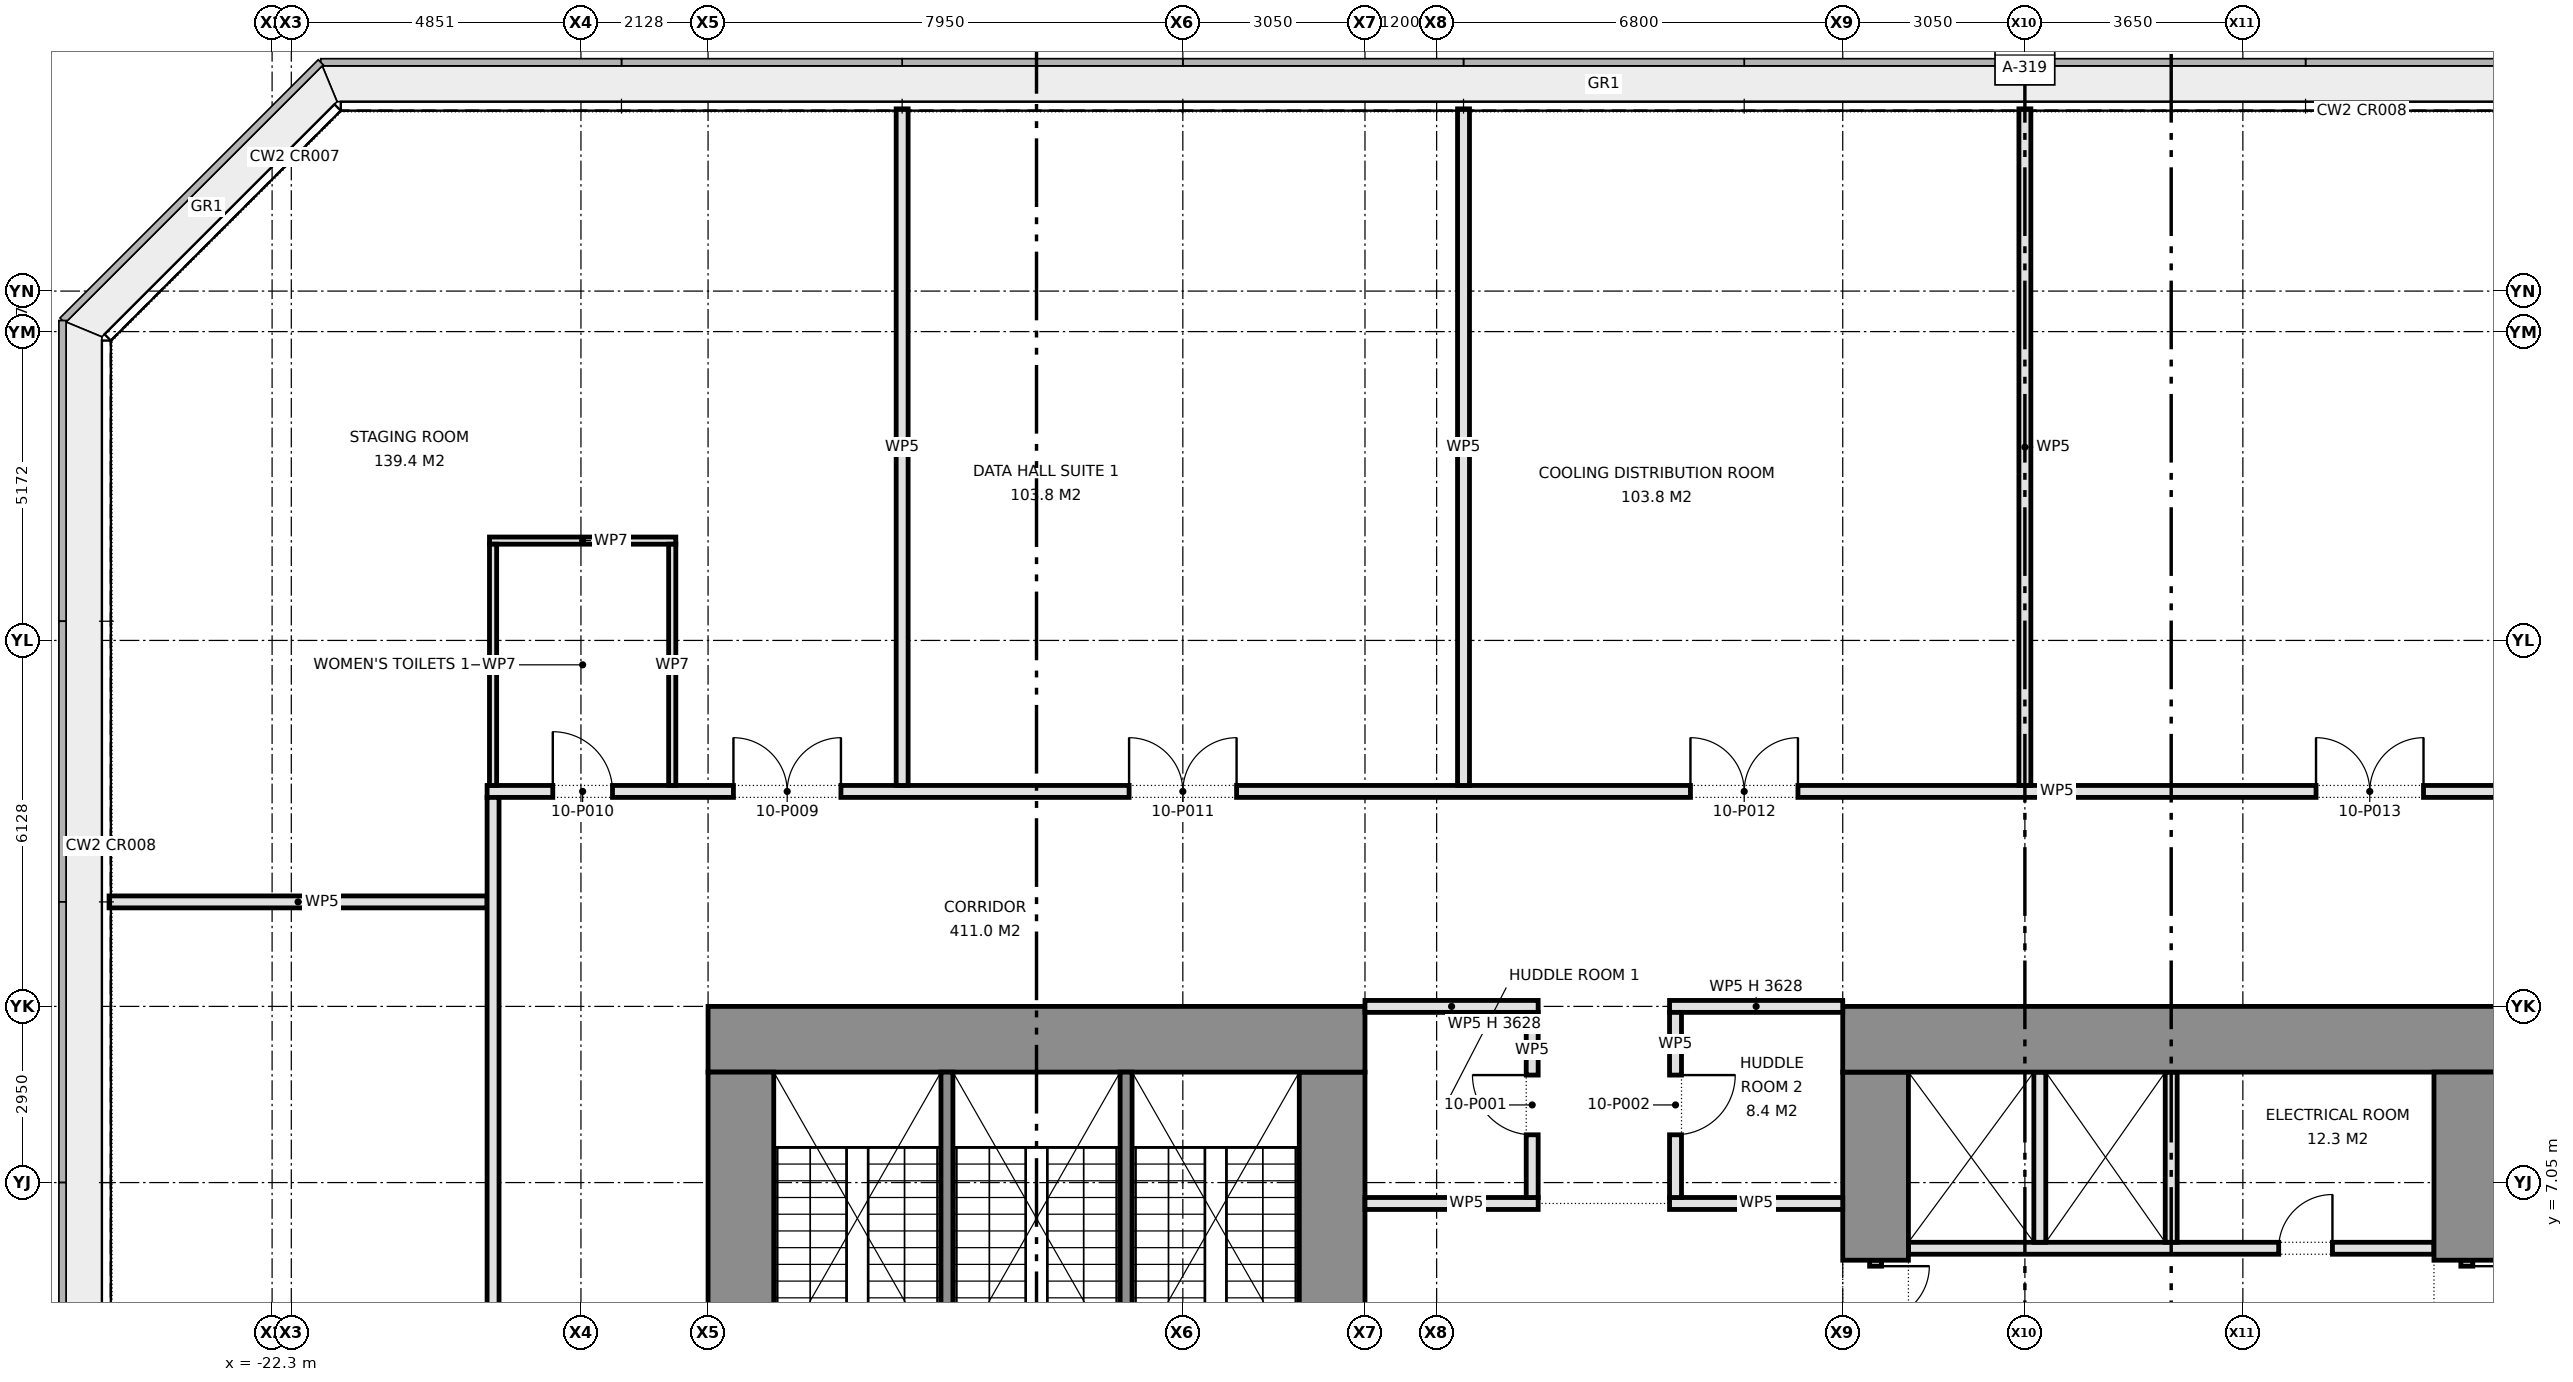
"""IFC4 building model, lengths in metres.
Left out: names, types, materials, properties, quantities, classifications, styles, units other than length and angle.
Written with IfcOpenShell. Run it as: python <this file> out.ifc"""

import sys

from ifc_helpers import new_model, si_unit, direction, frame, frame_2d, origin, place, context, subcontext, project, spatial, rectangle, extrude, element, fill, save


model = new_model("IFC4")
c1 = context("Model", 3, precision=1e-05, world=origin(), true_north=direction((0.0, 1.0)))
c2 = subcontext(c1, "Body", "Model", "MODEL_VIEW")
j1 = project(units=[si_unit("LENGTHUNIT", "METRE"), si_unit("PLANEANGLEUNIT", "RADIAN")], contexts=[c1])
p1 = place(None, origin())
s1 = spatial("IfcSite", under=j1, at=p1, CompositionType="ELEMENT")
p2 = place(p1, origin())
s2 = spatial("IfcBuilding", under=s1, at=p2, CompositionType="ELEMENT")
p3 = place(p2, frame((0.0, 0.0, 44.9)))
s3 = spatial("IfcBuildingStorey", under=s2, at=p3, CompositionType="ELEMENT", Elevation=44.9)
p4 = place(p3, frame((-15.0, 9.45, 0.0), z_axis=(0.0, 0.0, 1.0), x_axis=(1.0, 0.0, 0.0)))
e1 = element("IfcWall", 1, at=p4, inside=s3, PredefinedType="SHEAR", context=c2, shape_type="SweptSolid", body=[
    extrude(rectangle(XDim=11.0, YDim=1.1, at=frame_2d((5.5, 0.0))), origin(), (0.0, 0.0, 1.0), 4.575),
])
p5 = place(p3, frame((-14.45, 3.68, 0.0), z_axis=(0.0, 0.0, 1.0), x_axis=(0.0, 1.0, 0.0)))
e2 = element("IfcWall", 2, at=p5, inside=s3, PredefinedType="SHEAR", context=c2, shape_type="SweptSolid", body=[
    extrude(rectangle(XDim=5.22, YDim=1.1, at=frame_2d((2.61, 0.0))), origin(), (0.0, 0.0, 1.0), 4.575),
])
p6 = place(p3, frame((-4.55, 1.55, 0.0), z_axis=(0.0, 0.0, 1.0), x_axis=(0.0, 1.0, 0.0)))
e3 = element("IfcWall", 3, at=p6, inside=s3, PredefinedType="SHEAR", context=c2, shape_type="SweptSolid", body=[
    extrude(rectangle(XDim=7.35, YDim=1.1, at=frame_2d((3.675, 0.0))), origin(), (0.0, 0.0, 1.0), 4.575),
])
for number, where, z_axis, x_axis in (
    (4, (-11.0, 2.38, 0.0), (0.0, 0.0, 1.0), (0.0, 1.0, 0.0)),
    (5, (-8.0, 2.38, 0.0), (0.0, 0.0, 1.0), (0.0, 1.0, 0.0)),
):
    element("IfcWall", number, at=place(p3, frame(where, z_axis=z_axis, x_axis=x_axis)), inside=s3, PredefinedType="SHEAR", context=c2, shape_type="SweptSolid", body=[
        extrude(rectangle(XDim=6.52, YDim=0.2, at=frame_2d((3.26, 0.0))), origin(), (0.0, 0.0, 1.0), 4.575),
    ])
p7 = place(p3, frame((15.0, 9.45, 0.0), z_axis=(0.0, 0.0, 1.0), x_axis=(-1.0, 0.0, 0.0)))
e6 = element("IfcWall", 6, at=p7, inside=s3, PredefinedType="SHEAR", context=c2, shape_type="SweptSolid", body=[
    extrude(rectangle(XDim=11.0, YDim=1.1, at=frame_2d((5.5, 0.0))), origin(), (0.0, 0.0, 1.0), 4.575),
])
p8 = place(p3, frame((14.45, 8.9, 0.0), z_axis=(0.0, 0.0, 1.0), x_axis=(0.0, -1.0, 0.0)))
e7 = element("IfcWall", 7, at=p8, inside=s3, PredefinedType="SHEAR", context=c2, shape_type="SweptSolid", body=[
    extrude(rectangle(XDim=3.15, YDim=1.1, at=frame_2d((1.575, 0.0))), origin(), (0.0, 0.0, 1.0), 4.575),
])
p9 = place(p3, frame((14.45, 5.75, 0.0), z_axis=(0.0, 0.0, 1.0), x_axis=(0.0, -1.0, 0.0)))
e8 = element("IfcWall", 8, at=p9, inside=s3, PredefinedType="PARTITIONING", context=c2, shape_type="SweptSolid", body=[
    extrude(rectangle(XDim=2.0, YDim=0.2, at=frame_2d((1.0, 0.0))), origin(), (0.0, 0.0, 1.0), 2.4),
])
p10 = place(p9, frame((0.1, 0.0, 0.0)))
e9 = element("IfcOpeningElement", 9, at=p10, cuts=e8, PredefinedType="OPENING", context=c2, shape_type="SweptSolid", body=[
    extrude(rectangle(XDim=1.8, YDim=2.1, at=frame_2d((0.9, 1.05))), frame((0.0, 0.11, 0.0), z_axis=(0.0, -1.0, 0.0), x_axis=(1.0, 0.0, 0.0)), (0.0, 0.0, 1.0), 0.22),
])
p11 = place(p3, frame((4.55, 8.9, 0.0), z_axis=(0.0, 0.0, 1.0), x_axis=(0.0, -1.0, 0.0)))
e10 = element("IfcWall", 10, at=p11, inside=s3, PredefinedType="SHEAR", context=c2, shape_type="SweptSolid", body=[
    extrude(rectangle(XDim=3.15, YDim=1.1, at=frame_2d((1.575, 0.0))), origin(), (0.0, 0.0, 1.0), 4.575),
])
p12 = place(p3, frame((4.55, 5.75, 0.0), z_axis=(0.0, 0.0, 1.0), x_axis=(0.0, -1.0, 0.0)))
e11 = element("IfcWall", 11, at=p12, inside=s3, PredefinedType="PARTITIONING", context=c2, shape_type="SweptSolid", body=[
    extrude(rectangle(XDim=2.0, YDim=0.2, at=frame_2d((1.0, 0.0))), origin(), (0.0, 0.0, 1.0), 2.4),
])
p13 = place(p12, frame((0.1, 0.0, 0.0)))
e12 = element("IfcOpeningElement", 12, at=p13, cuts=e11, PredefinedType="OPENING", context=c2, shape_type="SweptSolid", body=[
    extrude(rectangle(XDim=1.8, YDim=2.1, at=frame_2d((0.9, 1.05))), frame((0.0, 0.11, 0.0), z_axis=(0.0, -1.0, 0.0), x_axis=(1.0, 0.0, 0.0)), (0.0, 0.0, 1.0), 0.22),
])
p14 = place(p3, frame((13.9, 5.95, 0.0), z_axis=(0.0, 0.0, 1.0), x_axis=(-1.0, 0.0, 0.0)))
e13 = element("IfcWall", 13, at=p14, inside=s3, PredefinedType="PARTITIONING", context=c2, shape_type="SweptSolid", body=[
    extrude(rectangle(XDim=8.8, YDim=0.2, at=frame_2d((4.4, 0.0))), origin(), (0.0, 0.0, 1.0), 4.575),
])
p15 = place(p14, frame((1.7, 0.0, 0.0)))
e14 = element("IfcOpeningElement", 14, at=p15, cuts=e13, PredefinedType="OPENING", context=c2, shape_type="SweptSolid", body=[
    extrude(rectangle(XDim=0.9, YDim=2.1, at=frame_2d((0.45, 1.05))), frame((0.0, 0.11, 0.0), z_axis=(0.0, -1.0, 0.0), x_axis=(1.0, 0.0, 0.0)), (0.0, 0.0, 1.0), 0.22),
])
for number, where, z_axis, x_axis in (
    (15, (9.5, 8.9, 0.0), (0.0, 0.0, 1.0), (0.0, -1.0, 0.0)),
    (16, (7.3, 8.9, 0.0), (0.0, 0.0, 1.0), (0.0, -1.0, 0.0)),
):
    element("IfcWall", number, at=place(p3, frame(where, z_axis=z_axis, x_axis=x_axis)), inside=s3, PredefinedType="PARTITIONING", context=c2, shape_type="SweptSolid", body=[
        extrude(rectangle(XDim=2.85, YDim=0.2, at=frame_2d((1.425, 0.0))), origin(), (0.0, 0.0, 1.0), 4.575),
    ])
for number, where, z_axis, x_axis in (
    (17, (-4.0, 6.7, 0.0), (0.0, 0.0, 1.0), (1.0, 0.0, 0.0)),
    (18, (1.1, 6.7, 0.0), (0.0, 0.0, 1.0), (1.0, 0.0, 0.0)),
):
    element("IfcWall", number, at=place(p3, frame(where, z_axis=z_axis, x_axis=x_axis)), inside=s3, PredefinedType="PARTITIONING", context=c2, shape_type="SweptSolid", body=[
        extrude(rectangle(XDim=2.9, YDim=0.2, at=frame_2d((1.45, 0.0))), origin(), (0.0, 0.0, 1.0), 4.575),
    ])
for number, where, z_axis, x_axis in (
    (19, (-4.0, 10.0, 0.0), (0.0, 0.0, 1.0), (1.0, 0.0, 0.0)),
    (20, (1.1, 10.0, 0.0), (0.0, 0.0, 1.0), (1.0, 0.0, 0.0)),
):
    element("IfcWall", number, at=place(p3, frame(where, z_axis=z_axis, x_axis=x_axis)), inside=s3, PredefinedType="PARTITIONING", context=c2, shape_type="SweptSolid", body=[
        extrude(rectangle(XDim=2.9, YDim=0.2, at=frame_2d((1.45, 0.0))), origin(), (0.0, 0.0, 1.0), 3.628),
    ])
p16 = place(p3, frame((-25.03, 11.75, 0.0), z_axis=(0.0, 0.0, 1.0), x_axis=(1.0, 0.0, 0.0)))
e21 = element("IfcWall", 21, at=p16, inside=s3, PredefinedType="PARTITIONING", context=c2, shape_type="SweptSolid", body=[
    extrude(rectangle(XDim=6.33, YDim=0.2, at=frame_2d((3.165, 0.0))), origin(), (0.0, 0.0, 1.0), 4.575),
])
p17 = place(p3, frame((-18.7, 13.6, 0.0), z_axis=(0.0, 0.0, 1.0), x_axis=(1.0, 0.0, 0.0)))
e22 = element("IfcWall", 22, at=p17, inside=s3, PredefinedType="PARTITIONING", context=c2, shape_type="SweptSolid", body=[
    extrude(rectangle(XDim=37.4, YDim=0.2, at=frame_2d((18.7, 0.0))), origin(), (0.0, 0.0, 1.0), 4.575),
])
p18 = place(p17, frame((4.125, 0.0, 0.0)))
e23 = element("IfcOpeningElement", 23, at=p18, cuts=e22, PredefinedType="OPENING", context=c2, shape_type="SweptSolid", body=[
    extrude(rectangle(XDim=1.8, YDim=2.1, at=frame_2d((0.9, 1.05))), frame((0.0, 0.11, 0.0), z_axis=(0.0, -1.0, 0.0), x_axis=(1.0, 0.0, 0.0)), (0.0, 0.0, 1.0), 0.22),
])
p19 = place(p17, frame((1.1, 0.0, 0.0)))
e24 = element("IfcOpeningElement", 24, at=p19, cuts=e22, PredefinedType="OPENING", context=c2, shape_type="SweptSolid", body=[
    extrude(rectangle(XDim=1.0, YDim=2.1, at=frame_2d((0.5, 1.05))), frame((0.0, 0.11, 0.0), z_axis=(0.0, -1.0, 0.0), x_axis=(1.0, 0.0, 0.0)), (0.0, 0.0, 1.0), 0.22),
])
p20 = place(p17, frame((10.75, 0.0, 0.0)))
e25 = element("IfcOpeningElement", 25, at=p20, cuts=e22, PredefinedType="OPENING", context=c2, shape_type="SweptSolid", body=[
    extrude(rectangle(XDim=1.8, YDim=2.1, at=frame_2d((0.9, 1.05))), frame((0.0, 0.11, 0.0), z_axis=(0.0, -1.0, 0.0), x_axis=(1.0, 0.0, 0.0)), (0.0, 0.0, 1.0), 0.22),
])
p21 = place(p17, frame((20.15, 0.0, 0.0)))
e26 = element("IfcOpeningElement", 26, at=p21, cuts=e22, PredefinedType="OPENING", context=c2, shape_type="SweptSolid", body=[
    extrude(rectangle(XDim=1.8, YDim=2.1, at=frame_2d((0.9, 1.05))), frame((0.0, 0.11, 0.0), z_axis=(0.0, -1.0, 0.0), x_axis=(1.0, 0.0, 0.0)), (0.0, 0.0, 1.0), 0.22),
])
p22 = place(p17, frame((30.625, 0.0, 0.0)))
e27 = element("IfcOpeningElement", 27, at=p22, cuts=e22, PredefinedType="OPENING", context=c2, shape_type="SweptSolid", body=[
    extrude(rectangle(XDim=1.8, YDim=2.1, at=frame_2d((0.9, 1.05))), frame((0.0, 0.11, 0.0), z_axis=(0.0, -1.0, 0.0), x_axis=(1.0, 0.0, 0.0)), (0.0, 0.0, 1.0), 0.22),
])
p23 = place(p3, frame((7.05, 13.7, 0.0), z_axis=(0.0, 0.0, 1.0), x_axis=(0.0, 1.0, 0.0)))
e28 = element("IfcWall", 28, at=p23, inside=s3, PredefinedType="PARTITIONING", context=c2, shape_type="SweptSolid", body=[
    extrude(rectangle(XDim=11.33, YDim=0.2, at=frame_2d((5.665, 0.0))), origin(), (0.0, 0.0, 1.0), 4.575),
])
p24 = place(p3, frame((1.2, 6.8, 0.0), z_axis=(0.0, 0.0, 1.0), x_axis=(0.0, 1.0, 0.0)))
e29 = element("IfcWall", 29, at=p24, inside=s3, PredefinedType="PARTITIONING", context=c2, shape_type="SweptSolid", body=[
    extrude(rectangle(XDim=3.1, YDim=0.2, at=frame_2d((1.55, 0.0))), origin(), (0.0, 0.0, 1.0), 4.575),
])
p25 = place(p24, frame((1.05, 0.0, 0.0)))
e30 = element("IfcOpeningElement", 30, at=p25, cuts=e29, PredefinedType="OPENING", context=c2, shape_type="SweptSolid", body=[
    extrude(rectangle(XDim=1.0, YDim=2.1, at=frame_2d((0.5, 1.05))), frame((0.0, 0.11, 0.0), z_axis=(0.0, -1.0, 0.0), x_axis=(1.0, 0.0, 0.0)), (0.0, 0.0, 1.0), 0.22),
])
p26 = place(p3, frame((-1.2, 6.8, 0.0), z_axis=(0.0, 0.0, 1.0), x_axis=(0.0, 1.0, 0.0)))
e31 = element("IfcWall", 31, at=p26, inside=s3, PredefinedType="PARTITIONING", context=c2, shape_type="SweptSolid", body=[
    extrude(rectangle(XDim=3.1, YDim=0.2, at=frame_2d((1.55, 0.0))), origin(), (0.0, 0.0, 1.0), 4.575),
])
p27 = place(p26, frame((1.05, 0.0, 0.0)))
e32 = element("IfcOpeningElement", 32, at=p27, cuts=e31, PredefinedType="OPENING", context=c2, shape_type="SweptSolid", body=[
    extrude(rectangle(XDim=1.0, YDim=2.1, at=frame_2d((0.5, 1.05))), frame((0.0, 0.11, 0.0), z_axis=(0.0, -1.0, 0.0), x_axis=(1.0, 0.0, 0.0)), (0.0, 0.0, 1.0), 0.22),
])
for number, where, z_axis, x_axis in (
    (33, (-2.35, 13.7, 0.0), (0.0, 0.0, 1.0), (0.0, 1.0, 0.0)),
    (34, (-11.75, 13.7, 0.0), (0.0, 0.0, 1.0), (0.0, 1.0, 0.0)),
):
    element("IfcWall", number, at=place(p3, frame(where, z_axis=z_axis, x_axis=x_axis)), inside=s3, PredefinedType="PARTITIONING", context=c2, shape_type="SweptSolid", body=[
        extrude(rectangle(XDim=11.33, YDim=0.2, at=frame_2d((5.665, 0.0))), origin(), (0.0, 0.0, 1.0), 4.575),
    ])
p28 = place(p3, frame((-18.6, -13.5, 0.0), z_axis=(0.0, 0.0, 1.0), x_axis=(0.0, 1.0, 0.0)))
e35 = element("IfcWall", 35, at=p28, inside=s3, PredefinedType="PARTITIONING", context=c2, shape_type="SweptSolid", body=[
    extrude(rectangle(XDim=27.0, YDim=0.2, at=frame_2d((13.5, 0.0))), origin(), (0.0, 0.0, 1.0), 4.575),
])
p29 = place(p28, frame((12.6, 0.0, 0.0)))
e36 = element("IfcOpeningElement", 36, at=p29, cuts=e35, PredefinedType="OPENING", context=c2, shape_type="SweptSolid", body=[
    extrude(rectangle(XDim=1.8, YDim=2.1, at=frame_2d((0.9, 1.05))), frame((0.0, 0.11, 0.0), z_axis=(0.0, -1.0, 0.0), x_axis=(1.0, 0.0, 0.0)), (0.0, 0.0, 1.0), 0.22),
])
p30 = place(p3, frame((-18.66, 17.8, 0.0), z_axis=(0.0, 0.0, 1.0), x_axis=(1.0, 0.0, 0.0)))
e37 = element("IfcWall", 37, at=p30, inside=s3, PredefinedType="PARTITIONING", context=c2, shape_type="SweptSolid", body=[
    extrude(rectangle(XDim=3.12, YDim=0.12, at=frame_2d((1.56, 0.0))), origin(), (0.0, 0.0, 1.0), 4.575),
])
for number, where, z_axis, x_axis in (
    (38, (-15.6, 13.7, 0.0), (0.0, 0.0, 1.0), (0.0, 1.0, 0.0)),
    (39, (-18.6, 13.7, 0.0), (0.0, 0.0, 1.0), (0.0, 1.0, 0.0)),
):
    element("IfcWall", number, at=place(p3, frame(where, z_axis=z_axis, x_axis=x_axis)), inside=s3, PredefinedType="PARTITIONING", context=c2, shape_type="SweptSolid", body=[
        extrude(rectangle(XDim=4.04, YDim=0.12, at=frame_2d((2.02, 0.0))), origin(), (0.0, 0.0, 1.0), 4.575),
    ])
p31 = place(p10, origin())
e40 = element("IfcDoor", 40, at=p31, inside=s3, OperationType="DOUBLE_DOOR_SINGLE_SWING", PredefinedType="DOOR", context=c2, shape_type="SweptSolid", body=[
    extrude(rectangle(XDim=1.8, YDim=2.1, at=frame_2d((0.9, 1.05))), frame((0.0, 0.025, 0.0), z_axis=(0.0, -1.0, 0.0), x_axis=(1.0, 0.0, 0.0)), (0.0, 0.0, 1.0), 0.05),
])
fill(e9, e40)
p32 = place(p13, origin())
e41 = element("IfcDoor", 41, at=p32, inside=s3, OperationType="DOUBLE_DOOR_SINGLE_SWING", PredefinedType="DOOR", context=c2, shape_type="SweptSolid", body=[
    extrude(rectangle(XDim=1.8, YDim=2.1, at=frame_2d((0.9, 1.05))), frame((0.0, 0.025, 0.0), z_axis=(0.0, -1.0, 0.0), x_axis=(1.0, 0.0, 0.0)), (0.0, 0.0, 1.0), 0.05),
])
fill(e12, e41)
p33 = place(p15, frame((0.9, 0.0, 0.0), z_axis=(0.0, 0.0, 1.0), x_axis=(-1.0, 0.0, 0.0)))
e42 = element("IfcDoor", 42, at=p33, inside=s3, OperationType="SINGLE_SWING_RIGHT", PredefinedType="DOOR", context=c2, shape_type="SweptSolid", body=[
    extrude(rectangle(XDim=0.9, YDim=2.1, at=frame_2d((0.45, 1.05))), frame((0.0, 0.025, 0.0), z_axis=(0.0, -1.0, 0.0), x_axis=(1.0, 0.0, 0.0)), (0.0, 0.0, 1.0), 0.05),
])
fill(e14, e42)
p34 = place(p27, origin())
e43 = element("IfcDoor", 43, at=p34, inside=s3, OperationType="SINGLE_SWING_RIGHT", PredefinedType="DOOR", context=c2, shape_type="SweptSolid", body=[
    extrude(rectangle(XDim=1.0, YDim=2.1, at=frame_2d((0.5, 1.05))), frame((0.0, 0.025, 0.0), z_axis=(0.0, -1.0, 0.0), x_axis=(1.0, 0.0, 0.0)), (0.0, 0.0, 1.0), 0.05),
])
fill(e32, e43)
p35 = place(p25, frame((1.0, 0.0, 0.0), z_axis=(0.0, 0.0, 1.0), x_axis=(-1.0, 0.0, 0.0)))
e44 = element("IfcDoor", 44, at=p35, inside=s3, OperationType="SINGLE_SWING_LEFT", PredefinedType="DOOR", context=c2, shape_type="SweptSolid", body=[
    extrude(rectangle(XDim=1.0, YDim=2.1, at=frame_2d((0.5, 1.05))), frame((0.0, 0.025, 0.0), z_axis=(0.0, -1.0, 0.0), x_axis=(1.0, 0.0, 0.0)), (0.0, 0.0, 1.0), 0.05),
])
fill(e30, e44)
p36 = place(p18, origin())
e45 = element("IfcDoor", 45, at=p36, inside=s3, OperationType="DOUBLE_DOOR_SINGLE_SWING", PredefinedType="DOOR", context=c2, shape_type="SweptSolid", body=[
    extrude(rectangle(XDim=1.8, YDim=2.1, at=frame_2d((0.9, 1.05))), frame((0.0, 0.025, 0.0), z_axis=(0.0, -1.0, 0.0), x_axis=(1.0, 0.0, 0.0)), (0.0, 0.0, 1.0), 0.05),
])
fill(e23, e45)
p37 = place(p19, origin())
e46 = element("IfcDoor", 46, at=p37, inside=s3, OperationType="SINGLE_SWING_LEFT", PredefinedType="DOOR", context=c2, shape_type="SweptSolid", body=[
    extrude(rectangle(XDim=1.0, YDim=2.1, at=frame_2d((0.5, 1.05))), frame((0.0, 0.025, 0.0), z_axis=(0.0, -1.0, 0.0), x_axis=(1.0, 0.0, 0.0)), (0.0, 0.0, 1.0), 0.05),
])
fill(e24, e46)
p38 = place(p20, origin())
e47 = element("IfcDoor", 47, at=p38, inside=s3, OperationType="DOUBLE_DOOR_SINGLE_SWING", PredefinedType="DOOR", context=c2, shape_type="SweptSolid", body=[
    extrude(rectangle(XDim=1.8, YDim=2.1, at=frame_2d((0.9, 1.05))), frame((0.0, 0.025, 0.0), z_axis=(0.0, -1.0, 0.0), x_axis=(1.0, 0.0, 0.0)), (0.0, 0.0, 1.0), 0.05),
])
fill(e25, e47)
p39 = place(p21, origin())
e48 = element("IfcDoor", 48, at=p39, inside=s3, OperationType="DOUBLE_DOOR_SINGLE_SWING", PredefinedType="DOOR", context=c2, shape_type="SweptSolid", body=[
    extrude(rectangle(XDim=1.8, YDim=2.1, at=frame_2d((0.9, 1.05))), frame((0.0, 0.025, 0.0), z_axis=(0.0, -1.0, 0.0), x_axis=(1.0, 0.0, 0.0)), (0.0, 0.0, 1.0), 0.05),
])
fill(e26, e48)
p40 = place(p22, origin())
e49 = element("IfcDoor", 49, at=p40, inside=s3, OperationType="DOUBLE_DOOR_SINGLE_SWING", PredefinedType="DOOR", context=c2, shape_type="SweptSolid", body=[
    extrude(rectangle(XDim=1.8, YDim=2.1, at=frame_2d((0.9, 1.05))), frame((0.0, 0.025, 0.0), z_axis=(0.0, -1.0, 0.0), x_axis=(1.0, 0.0, 0.0)), (0.0, 0.0, 1.0), 0.05),
])
fill(e27, e49)
save(model, sys.argv[1])
